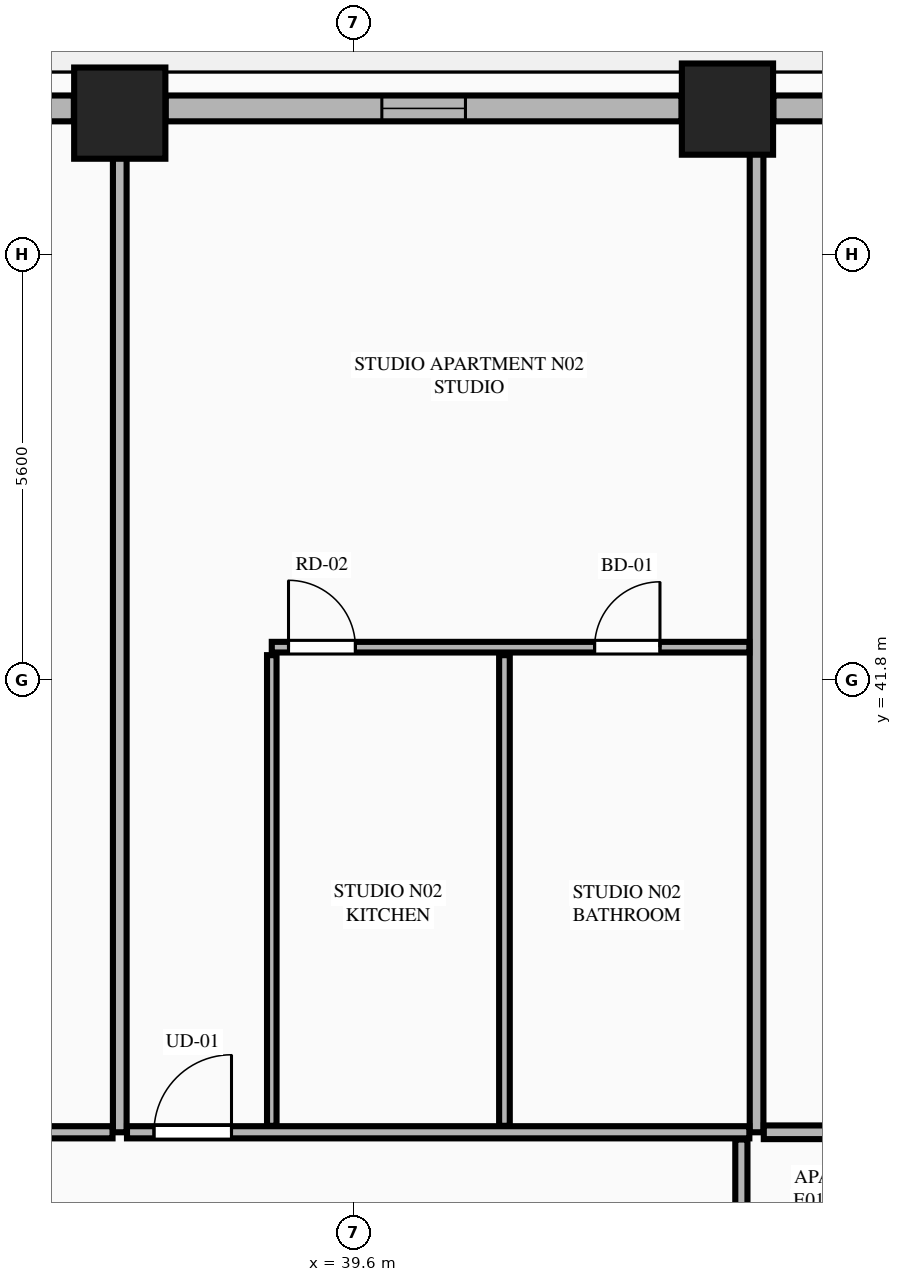
"""IFC4 building model, lengths in metres.
Left out: names, types, materials, properties, quantities, classifications, styles, units other than length and angle.
Written with IfcOpenShell. Run it as: python <this file> out.ifc"""

import sys

from ifc_helpers import new_model, si_unit, direction, frame, frame_2d, origin, origin_2d, place, context, subcontext, project, spatial, rectangle, extrude, element, fill, save


model = new_model("IFC4")
c1 = context("Model", 3, precision=1e-05, world=origin(), true_north=direction((0.0, 1.0)))
c2 = subcontext(c1, "Body", "Model", "MODEL_VIEW")
j1 = project(units=[si_unit("LENGTHUNIT", "METRE"), si_unit("PLANEANGLEUNIT", "RADIAN")], contexts=[c1])
p1 = place(None, origin())
s1 = spatial("IfcSite", under=j1, at=p1, CompositionType="ELEMENT")
p2 = place(p1, origin())
s2 = spatial("IfcBuilding", under=s1, at=p2, CompositionType="ELEMENT")
p3 = place(p2, frame((0.0, 0.0, 32.0)))
s3 = spatial("IfcBuildingStorey", under=s2, at=p3, CompositionType="ELEMENT", Elevation=32.0)
for number, where, z_axis, x_axis in (
    (1, (44.517, 49.311, 0.0), (0.0, 0.0, 1.0), (1.0, 0.0, 0.0)),
    (2, (36.522, 49.258, 0.0), (0.0, 0.0, 1.0), (1.0, 0.0, 0.0)),
):
    element("IfcColumn", number, at=place(p3, frame(where, z_axis=z_axis, x_axis=x_axis)), inside=s3, PredefinedType="COLUMN", context=c2, shape_type="SweptSolid", body=[
        extrude(rectangle(XDim=1.2, YDim=1.2, at=origin_2d()), origin(), (0.0, 0.0, 1.0), 3.55),
    ])
p4 = place(p3, frame((46.366, 49.32, 0.0), z_axis=(0.0, 0.0, 1.0), x_axis=(-1.0, 0.0, 0.0)))
e3 = element("IfcWall", 3, at=p4, inside=s3, PredefinedType="STANDARD", context=c2, shape_type="SweptSolid", body=[
    extrude(rectangle(XDim=1.245, YDim=0.34, at=frame_2d((0.623, 0.0))), origin(), (0.0, 0.0, 1.0), 3.33),
])
p5 = place(p3, frame((43.913, 49.32, 0.0), z_axis=(0.0, 0.0, 1.0), x_axis=(-1.0, 0.0, 0.0)))
e4 = element("IfcWall", 4, at=p5, inside=s3, PredefinedType="STANDARD", context=c2, shape_type="SweptSolid", body=[
    extrude(rectangle(XDim=6.787, YDim=0.34, at=frame_2d((3.394, 0.0))), origin(), (0.0, 0.0, 1.0), 2.787),
])
p6 = place(p5, frame((2.843, 0.0, 0.75)))
e5 = element("IfcOpeningElement", 5, at=p6, cuts=e4, PredefinedType="OPENING", context=c2, shape_type="SweptSolid", body=[
    extrude(rectangle(XDim=1.1, YDim=1.887, at=frame_2d((0.55, 0.943))), frame((0.0, 0.18, 0.0), z_axis=(0.0, -1.0, 0.0), x_axis=(1.0, 0.0, 0.0)), (0.0, 0.0, 1.0), 0.36),
])
p7 = place(p3, frame((35.918, 49.32, 0.0), z_axis=(0.0, 0.0, 1.0), x_axis=(-1.0, 0.0, 0.0)))
e6 = element("IfcWall", 6, at=p7, inside=s3, PredefinedType="STANDARD", context=c2, shape_type="SweptSolid", body=[
    extrude(rectangle(XDim=7.036, YDim=0.34, at=frame_2d((3.518, 0.0))), origin(), (0.0, 0.0, 1.0), 2.787),
])
p8 = place(p7, frame((2.968, 0.0, 0.0)))
e7 = element("IfcOpeningElement", 7, at=p8, cuts=e6, PredefinedType="OPENING", context=c2, shape_type="SweptSolid", body=[
    extrude(rectangle(XDim=1.1, YDim=2.25, at=frame_2d((0.55, 1.125))), frame((0.0, 0.18, 0.0), z_axis=(0.0, -1.0, 0.0), x_axis=(1.0, 0.0, 0.0)), (0.0, 0.0, 1.0), 0.36),
])
p9 = place(p3, frame((36.522, 35.85, 0.0), z_axis=(0.0, 0.0, 1.0), x_axis=(0.0, 1.0, 0.0)))
e8 = element("IfcWall", 8, at=p9, inside=s3, PredefinedType="PARTITIONING", context=c2, shape_type="SweptSolid", body=[
    extrude(rectangle(XDim=13.295, YDim=0.18, at=frame_2d((6.647, 0.0))), origin(), (0.0, 0.0, 1.0), 2.636),
])
p10 = place(p3, frame((44.9, 35.85, 0.0), z_axis=(0.0, 0.0, 1.0), x_axis=(0.0, 1.0, 0.0)))
e9 = element("IfcWall", 9, at=p10, inside=s3, PredefinedType="PARTITIONING", context=c2, shape_type="SweptSolid", body=[
    extrude(rectangle(XDim=13.295, YDim=0.18, at=frame_2d((6.647, 0.0))), origin(), (0.0, 0.0, 1.0), 3.33),
])
p11 = place(p3, frame((19.995, 35.85, 0.0), z_axis=(0.0, 0.0, 1.0), x_axis=(1.0, 0.0, 0.0)))
e10 = element("IfcWall", 10, at=p11, inside=s3, PredefinedType="PARTITIONING", context=c2, shape_type="SweptSolid", body=[
    extrude(rectangle(XDim=16.432, YDim=0.16, at=frame_2d((8.216, 0.0))), origin(), (0.0, 0.0, 1.0), 3.33),
])
p12 = place(p11, frame((14.577, 0.0, 0.0)))
e11 = element("IfcOpeningElement", 11, at=p12, cuts=e10, PredefinedType="OPENING", context=c2, shape_type="SweptSolid", body=[
    extrude(rectangle(XDim=1.02, YDim=2.25, at=frame_2d((0.51, 1.125))), frame((0.0, 0.09, 0.0), z_axis=(0.0, -1.0, 0.0), x_axis=(1.0, 0.0, 0.0)), (0.0, 0.0, 1.0), 0.18),
])
p13 = place(p3, frame((36.617, 35.85, 0.0), z_axis=(0.0, 0.0, 1.0), x_axis=(1.0, 0.0, 0.0)))
e12 = element("IfcWall", 12, at=p13, inside=s3, PredefinedType="PARTITIONING", context=c2, shape_type="SweptSolid", body=[
    extrude(rectangle(XDim=8.188, YDim=0.16, at=frame_2d((4.094, 0.0))), origin(), (0.0, 0.0, 1.0), 3.33),
])
p14 = place(p13, frame((0.355, 0.0, 0.0)))
e13 = element("IfcOpeningElement", 13, at=p14, cuts=e12, PredefinedType="OPENING", context=c2, shape_type="SweptSolid", body=[
    extrude(rectangle(XDim=1.02, YDim=2.25, at=frame_2d((0.51, 1.125))), frame((0.0, 0.09, 0.0), z_axis=(0.0, -1.0, 0.0), x_axis=(1.0, 0.0, 0.0)), (0.0, 0.0, 1.0), 0.18),
])
p15 = place(p3, frame((38.522, 35.935, 0.0), z_axis=(0.0, 0.0, 1.0), x_axis=(0.0, 1.0, 0.0)))
e14 = element("IfcWall", 14, at=p15, inside=s3, PredefinedType="PARTITIONING", context=c2, shape_type="SweptSolid", body=[
    extrude(rectangle(XDim=6.192, YDim=0.125, at=frame_2d((3.096, 0.0))), origin(), (0.0, 0.0, 1.0), 3.33),
])
p16 = place(p3, frame((38.522, 42.232, 0.0), z_axis=(0.0, 0.0, 1.0), x_axis=(1.0, 0.0, 0.0)))
e15 = element("IfcWall", 15, at=p16, inside=s3, PredefinedType="PLUMBINGWALL", context=c2, shape_type="SweptSolid", body=[
    extrude(rectangle(XDim=6.283, YDim=0.14, at=frame_2d((3.142, 0.0))), origin(), (0.0, 0.0, 1.0), 3.33),
])
p17 = place(p16, frame((4.247, 0.0, 0.0)))
e16 = element("IfcOpeningElement", 16, at=p17, cuts=e15, PredefinedType="OPENING", context=c2, shape_type="SweptSolid", body=[
    extrude(rectangle(XDim=0.86, YDim=2.1, at=frame_2d((0.43, 1.05))), frame((0.0, 0.08, 0.0), z_axis=(0.0, -1.0, 0.0), x_axis=(1.0, 0.0, 0.0)), (0.0, 0.0, 1.0), 0.16),
])
p18 = place(p16, frame((0.22, 0.0, 0.0)))
e17 = element("IfcOpeningElement", 17, at=p18, cuts=e15, PredefinedType="OPENING", context=c2, shape_type="SweptSolid", body=[
    extrude(rectangle(XDim=0.88, YDim=2.15, at=frame_2d((0.44, 1.075))), frame((0.0, 0.08, 0.0), z_axis=(0.0, -1.0, 0.0), x_axis=(1.0, 0.0, 0.0)), (0.0, 0.0, 1.0), 0.16),
])
p19 = place(p3, frame((41.583, 35.935, 0.0), z_axis=(0.0, 0.0, 1.0), x_axis=(0.0, 1.0, 0.0)))
e18 = element("IfcWall", 18, at=p19, inside=s3, PredefinedType="PLUMBINGWALL", context=c2, shape_type="SweptSolid", body=[
    extrude(rectangle(XDim=6.192, YDim=0.14, at=frame_2d((3.096, 0.0))), origin(), (0.0, 0.0, 1.0), 3.33),
])
p20 = place(p3, frame((44.995, 35.85, 0.0), z_axis=(0.0, 0.0, 1.0), x_axis=(1.0, 0.0, 0.0)))
e19 = element("IfcWall", 19, at=p20, inside=s3, PredefinedType="PARTITIONING", context=c2, shape_type="SweptSolid", body=[
    extrude(rectangle(XDim=9.14, YDim=0.18, at=frame_2d((4.57, 0.0))), origin(), (0.0, 0.0, 1.0), 3.33),
])
p21 = place(p3, frame((44.7, 16.045, 0.0), z_axis=(0.0, 0.0, 1.0), x_axis=(0.0, 1.0, 0.0)))
e20 = element("IfcWall", 20, at=p21, inside=s3, PredefinedType="PARTITIONING", context=c2, shape_type="SweptSolid", body=[
    extrude(rectangle(XDim=19.71, YDim=0.16, at=frame_2d((9.855, 0.0))), origin(), (0.0, 0.0, 1.0), 3.33),
])
p22 = place(p21, frame((0.45, 0.0, 0.0)))
e21 = element("IfcOpeningElement", 21, at=p22, cuts=e20, PredefinedType="OPENING", context=c2, shape_type="SweptSolid", body=[
    extrude(rectangle(XDim=1.02, YDim=2.25, at=frame_2d((0.51, 1.125))), frame((0.0, 0.09, 0.0), z_axis=(0.0, -1.0, 0.0), x_axis=(1.0, 0.0, 0.0)), (0.0, 0.0, 1.0), 0.18),
])
p23 = place(p6, origin())
e22 = element("IfcWindow", 22, at=p23, inside=s3, PartitioningType="SINGLE_PANEL", PredefinedType="WINDOW", context=c2, shape_type="SweptSolid", body=[
    extrude(rectangle(XDim=1.1, YDim=1.887, at=frame_2d((0.55, 0.943))), frame((0.0, 0.03, 0.0), z_axis=(0.0, -1.0, 0.0), x_axis=(1.0, 0.0, 0.0)), (0.0, 0.0, 1.0), 0.06),
])
fill(e5, e22)
p24 = place(p17, origin())
e23 = element("IfcDoor", 23, at=p24, inside=s3, OperationType="SINGLE_SWING_RIGHT", PredefinedType="DOOR", context=c2, shape_type="SweptSolid", body=[
    extrude(rectangle(XDim=0.86, YDim=2.1, at=frame_2d((0.43, 1.05))), frame((0.0, 0.025, 0.0), z_axis=(0.0, -1.0, 0.0), x_axis=(1.0, 0.0, 0.0)), (0.0, 0.0, 1.0), 0.05),
])
fill(e16, e23)
p25 = place(p14, origin())
e24 = element("IfcDoor", 24, at=p25, inside=s3, OperationType="SINGLE_SWING_RIGHT", PredefinedType="DOOR", context=c2, shape_type="SweptSolid", body=[
    extrude(rectangle(XDim=1.02, YDim=2.25, at=frame_2d((0.51, 1.125))), frame((0.0, 0.025, 0.0), z_axis=(0.0, -1.0, 0.0), x_axis=(1.0, 0.0, 0.0)), (0.0, 0.0, 1.0), 0.05),
])
fill(e13, e24)
p26 = place(p18, origin())
e25 = element("IfcDoor", 25, at=p26, inside=s3, OperationType="SINGLE_SWING_LEFT", PredefinedType="DOOR", context=c2, shape_type="SweptSolid", body=[
    extrude(rectangle(XDim=0.88, YDim=2.15, at=frame_2d((0.44, 1.075))), frame((0.0, 0.025, 0.0), z_axis=(0.0, -1.0, 0.0), x_axis=(1.0, 0.0, 0.0)), (0.0, 0.0, 1.0), 0.05),
])
fill(e17, e25)
save(model, sys.argv[1])
